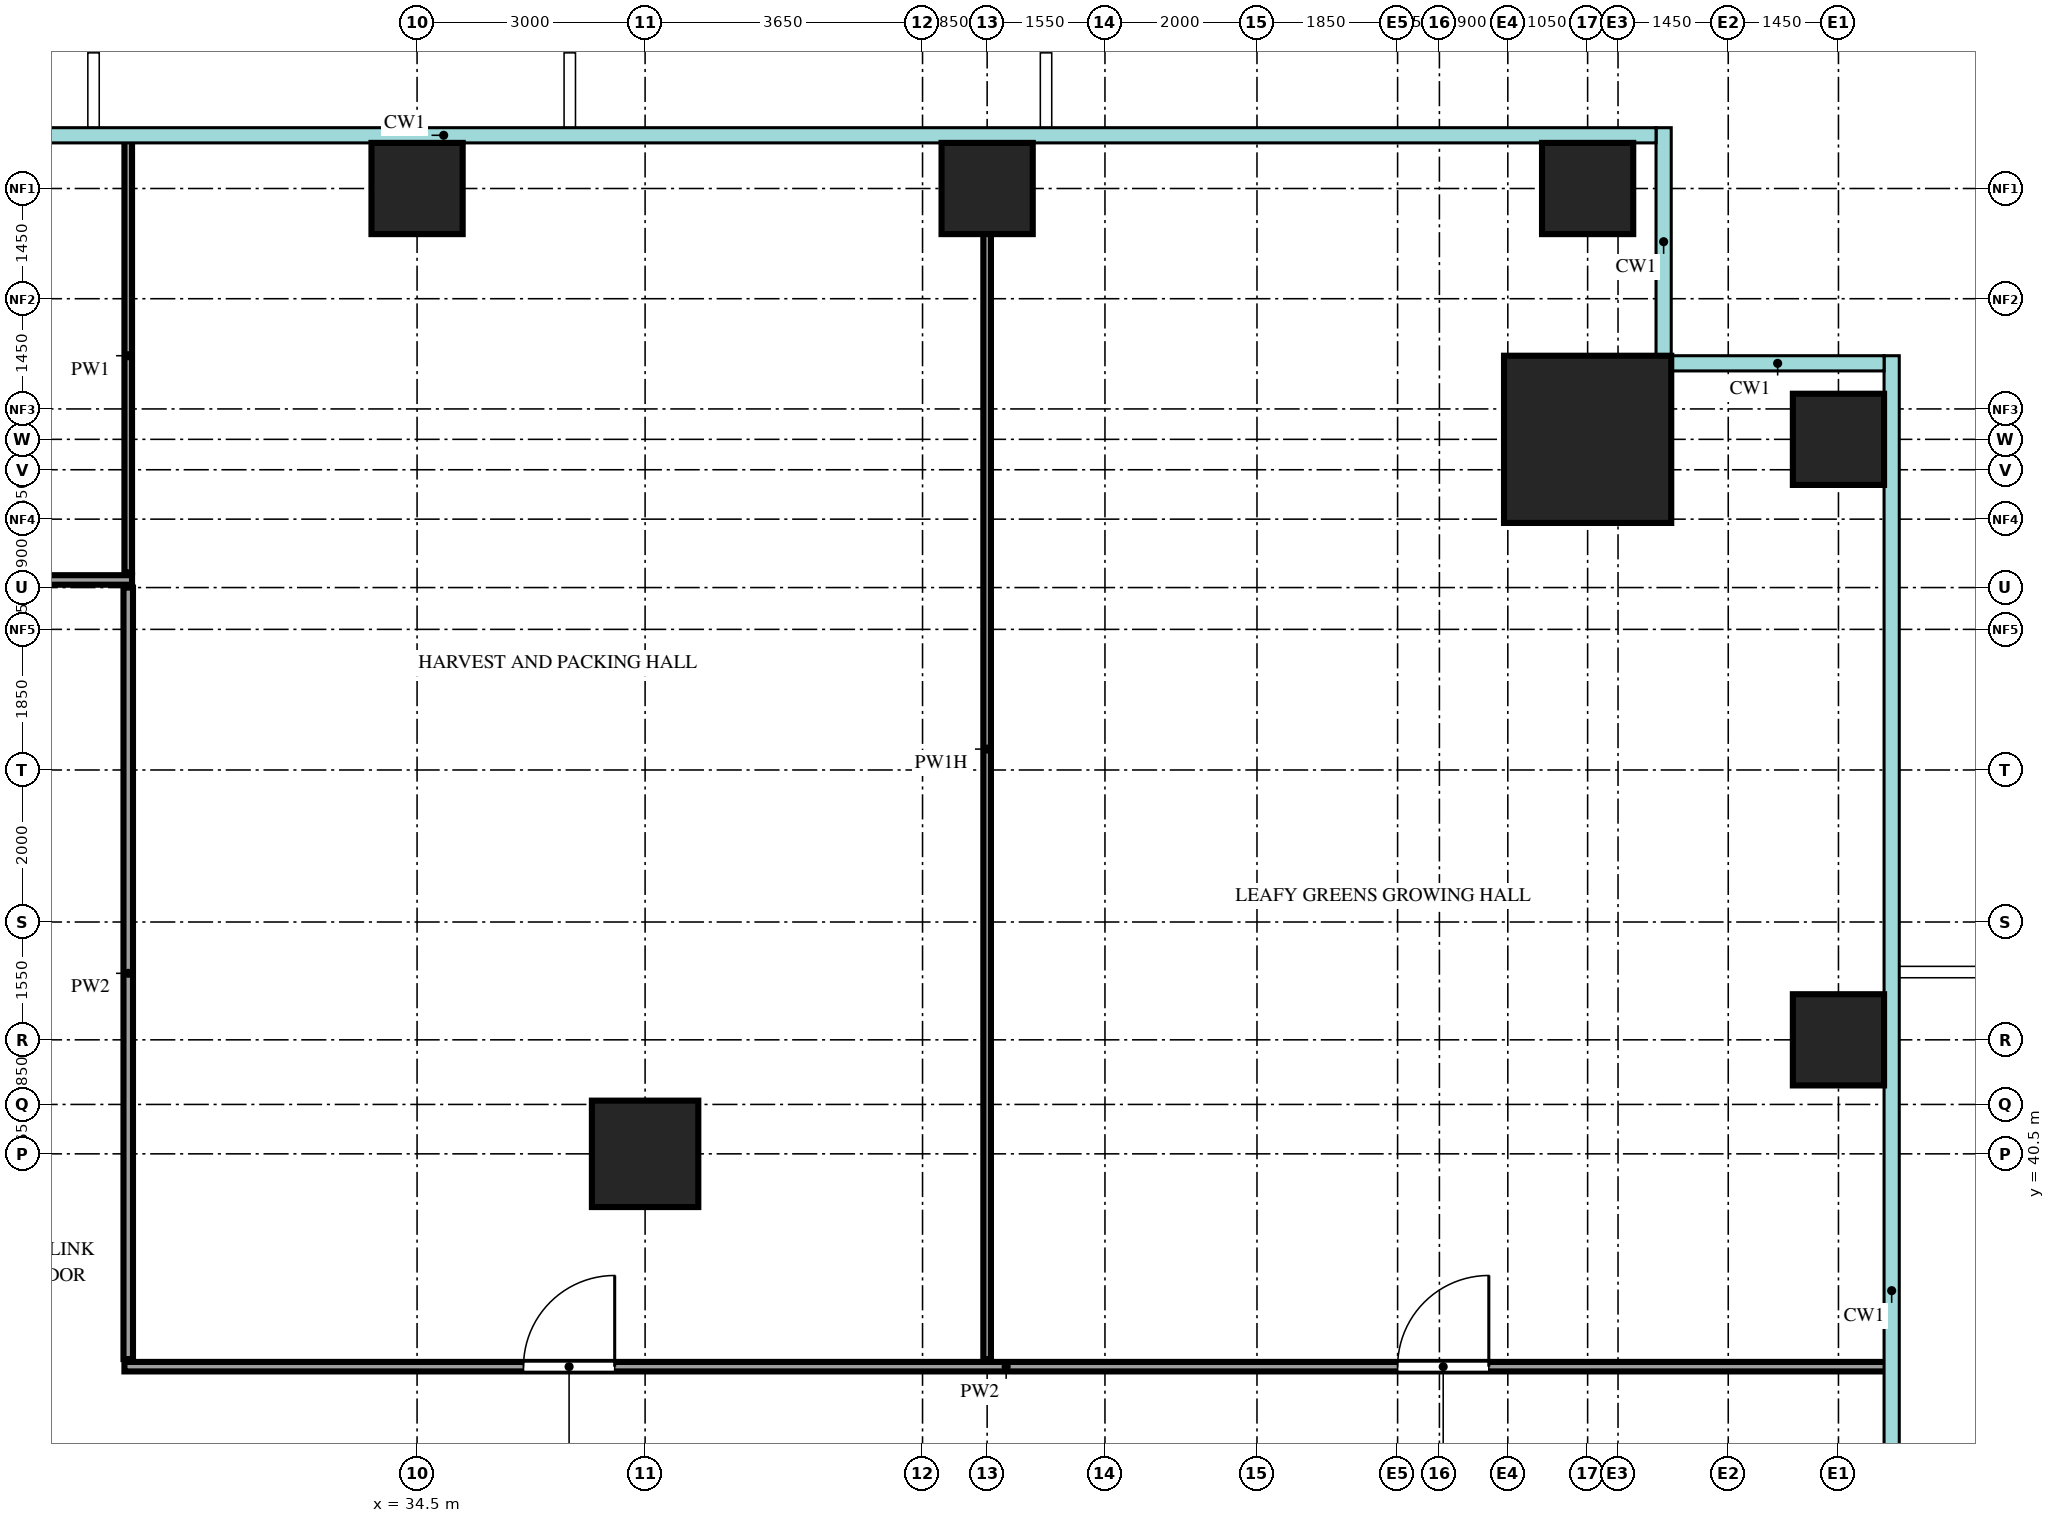
"""IFC4 building model, lengths in metres.
Left out: names, types, materials, properties, quantities, classifications, styles, units other than length and angle.
Written with IfcOpenShell. Run it as: python <this file> out.ifc"""

import sys

from ifc_helpers import new_model, si_unit, direction, frame, frame_2d, origin, origin_2d, place, context, subcontext, project, spatial, rectangle, extrude, source, transform, mapped, element, fill, save


model = new_model("IFC4")
c1 = context("Model", 3, precision=1e-05, world=origin(), true_north=direction((0.0, 1.0)))
c2 = subcontext(c1, "Body", "Model", "MODEL_VIEW")
j1 = project(units=[si_unit("LENGTHUNIT", "METRE"), si_unit("PLANEANGLEUNIT", "RADIAN")], contexts=[c1])
p1 = place(None, origin())
s1 = spatial("IfcSite", under=j1, at=p1, CompositionType="ELEMENT")
p2 = place(p1, origin())
s2 = spatial("IfcBuilding", under=s1, at=p2, CompositionType="ELEMENT")
p3 = place(p2, frame((0.0, 0.0, 37.5)))
s3 = spatial("IfcBuildingStorey", under=s2, at=p3, CompositionType="ELEMENT", Elevation=37.5)
m1 = source(origin(), c2, "Body", "SweptSolid", [
    extrude(rectangle(XDim=2.2, YDim=2.2, at=origin_2d()), origin(), (0.0, 0.0, 1.0), 4.5),
])
p4 = place(p3, frame((49.9, 49.9, 0.0), z_axis=(0.0, 0.0, 1.0), x_axis=(1.0, 0.0, 0.0)))
e1 = element("IfcColumn", 1, at=p4, inside=s3, PredefinedType="COLUMN", context=c2, shape_type="MappedRepresentation", body=[
    mapped(m1, transform((0.0, 0.0, 0.0))),
])
m2 = source(origin(), c2, "Body", "SweptSolid", [
    extrude(rectangle(XDim=1.2, YDim=1.2, at=origin_2d()), origin(), (0.0, 0.0, 1.0), 4.2),
])
for number, where, z_axis, x_axis in (
    (2, (53.2, 42.0, 0.0), (0.0, 0.0, 1.0), (1.0, 0.0, 0.0)),
    (3, (53.2, 49.9, 0.0), (0.0, 0.0, 1.0), (1.0, 0.0, 0.0)),
    (4, (34.5, 53.2, 0.0), (0.0, 0.0, 1.0), (1.0, 0.0, 0.0)),
    (5, (42.0, 53.2, 0.0), (0.0, 0.0, 1.0), (1.0, 0.0, 0.0)),
    (6, (49.9, 53.2, 0.0), (0.0, 0.0, 1.0), (1.0, 0.0, 0.0)),
):
    element("IfcColumn", number, at=place(p3, frame(where, z_axis=z_axis, x_axis=x_axis)), inside=s3, PredefinedType="COLUMN", context=c2, shape_type="MappedRepresentation", body=[
        mapped(m2, transform((0.0, 0.0, 0.0))),
    ])
m3 = source(origin(), c2, "Body", "SweptSolid", [
    extrude(rectangle(XDim=1.4, YDim=1.4, at=origin_2d()), origin(), (0.0, 0.0, 1.0), 4.2),
])
p5 = place(p3, frame((37.5, 40.5, 0.0), z_axis=(0.0, 0.0, 1.0), x_axis=(1.0, 0.0, 0.0)))
e7 = element("IfcColumn", 7, at=p5, inside=s3, PredefinedType="COLUMN", context=c2, shape_type="MappedRepresentation", body=[
    mapped(m3, transform((0.0, 0.0, 0.0))),
])
m4 = source(origin(), c2, "Body", "SweptSolid", [
    extrude(rectangle(XDim=23.2, YDim=0.125, at=frame_2d((11.6, 0.0))), origin(), (0.0, 0.0, 1.0), 4.3),
])
p6 = place(p3, frame((30.65, 37.7, 0.0), z_axis=(0.0, 0.0, 1.0), x_axis=(1.0, 0.0, 0.0)))
e8 = element("IfcWall", 8, at=p6, inside=s3, PredefinedType="PARTITIONING", context=c2, shape_type="MappedRepresentation", body=[
    mapped(m4, transform((0.0, 0.0, 0.0))),
])
m5 = source(origin(), c2, "Body", "SweptSolid", [
    extrude(rectangle(XDim=1.2, YDim=2.1, at=frame_2d((0.6, 1.05))), frame((0.0, 0.073, 0.0), z_axis=(0.0, -1.0, 0.0), x_axis=(1.0, 0.0, 0.0)), (0.0, 0.0, 1.0), 0.145),
])
p7 = place(p6, frame((5.25, 0.0, 0.0)))
e9 = element("IfcOpeningElement", 9, at=p7, cuts=e8, PredefinedType="OPENING", context=c2, shape_type="MappedRepresentation", body=[
    mapped(m5, transform((0.0, 0.0, 0.0))),
])
p8 = place(p6, frame((16.75, 0.0, 0.0)))
e10 = element("IfcOpeningElement", 10, at=p8, cuts=e8, PredefinedType="OPENING", context=c2, shape_type="MappedRepresentation", body=[
    mapped(m5, transform((0.0, 0.0, 0.0))),
])
m6 = source(origin(), c2, "Body", "SweptSolid", [
    extrude(rectangle(XDim=10.15, YDim=0.125, at=frame_2d((5.075, 0.0))), origin(), (0.0, 0.0, 1.0), 4.3),
])
p9 = place(p3, frame((30.7, 37.8, 0.0), z_axis=(0.0, 0.0, 1.0), x_axis=(0.0, 1.0, 0.0)))
e11 = element("IfcWall", 11, at=p9, inside=s3, PredefinedType="PARTITIONING", context=c2, shape_type="MappedRepresentation", body=[
    mapped(m6, transform((0.0, 0.0, 0.0))),
])
m7 = source(origin(), c2, "Body", "SweptSolid", [
    extrude(rectangle(XDim=16.05, YDim=0.1, at=frame_2d((8.025, 0.0))), origin(), (0.0, 0.0, 1.0), 3.7),
])
p10 = place(p3, frame((42.0, 37.8, 0.0), z_axis=(0.0, 0.0, 1.0), x_axis=(0.0, 1.0, 0.0)))
e12 = element("IfcWall", 12, at=p10, inside=s3, PredefinedType="PARTITIONING", context=c2, shape_type="MappedRepresentation", body=[
    mapped(m7, transform((0.0, 0.0, 0.0))),
])
m8 = source(origin(), c2, "Body", "SweptSolid", [
    extrude(rectangle(XDim=26.45, YDim=0.125, at=frame_2d((13.225, 0.0))), origin(), (0.0, 0.0, 1.0), 4.3),
])
p11 = place(p3, frame((4.3, 48.05, 0.0), z_axis=(0.0, 0.0, 1.0), x_axis=(1.0, 0.0, 0.0)))
e13 = element("IfcWall", 13, at=p11, inside=s3, PredefinedType="PARTITIONING", context=c2, shape_type="MappedRepresentation", body=[
    mapped(m8, transform((0.0, 0.0, 0.0))),
])
m9 = source(origin(), c2, "Body", "SweptSolid", [
    extrude(rectangle(XDim=0.9, YDim=2.1, at=frame_2d((0.45, 1.05))), frame((0.0, 0.073, 0.0), z_axis=(0.0, -1.0, 0.0), x_axis=(1.0, 0.0, 0.0)), (0.0, 0.0, 1.0), 0.145),
])
p12 = place(p11, frame((3.35, 0.0, 0.0)))
e14 = element("IfcOpeningElement", 14, at=p12, cuts=e13, PredefinedType="OPENING", context=c2, shape_type="MappedRepresentation", body=[
    mapped(m9, transform((0.0, 0.0, 0.0))),
])
p13 = place(p11, frame((10.85, 0.0, 0.0)))
e15 = element("IfcOpeningElement", 15, at=p13, cuts=e13, PredefinedType="OPENING", context=c2, shape_type="MappedRepresentation", body=[
    mapped(m9, transform((0.0, 0.0, 0.0))),
])
p14 = place(p11, frame((20.35, 0.0, 0.0)))
e16 = element("IfcOpeningElement", 16, at=p14, cuts=e13, PredefinedType="OPENING", context=c2, shape_type="MappedRepresentation", body=[
    mapped(m9, transform((0.0, 0.0, 0.0))),
])
m10 = source(origin(), c2, "Body", "SweptSolid", [
    extrude(rectangle(XDim=5.7, YDim=0.1, at=frame_2d((2.85, 0.0))), origin(), (0.0, 0.0, 1.0), 4.3),
])
p15 = place(p3, frame((30.7, 48.15, 0.0), z_axis=(0.0, 0.0, 1.0), x_axis=(0.0, 1.0, 0.0)))
e17 = element("IfcWall", 17, at=p15, inside=s3, PredefinedType="PARTITIONING", context=c2, shape_type="MappedRepresentation", body=[
    mapped(m10, transform((0.0, 0.0, 0.0))),
])
m11 = source(origin(), c2, "Body", "SweptSolid", [
    extrude(rectangle(XDim=1.2, YDim=2.1, at=frame_2d((0.6, 1.05))), frame((0.0, 0.025, 0.0), z_axis=(0.0, -1.0, 0.0), x_axis=(1.0, 0.0, 0.0)), (0.0, 0.0, 1.0), 0.05),
])
p16 = place(p7, origin())
e18 = element("IfcDoor", 18, at=p16, inside=s3, OperationType="SINGLE_SWING_LEFT", PredefinedType="DOOR", context=c2, shape_type="MappedRepresentation", body=[
    mapped(m11, transform((0.0, 0.0, 0.0))),
])
fill(e9, e18)
p17 = place(p8, origin())
e19 = element("IfcDoor", 19, at=p17, inside=s3, OperationType="SINGLE_SWING_LEFT", PredefinedType="DOOR", context=c2, shape_type="MappedRepresentation", body=[
    mapped(m11, transform((0.0, 0.0, 0.0))),
])
fill(e10, e19)
save(model, sys.argv[1])
